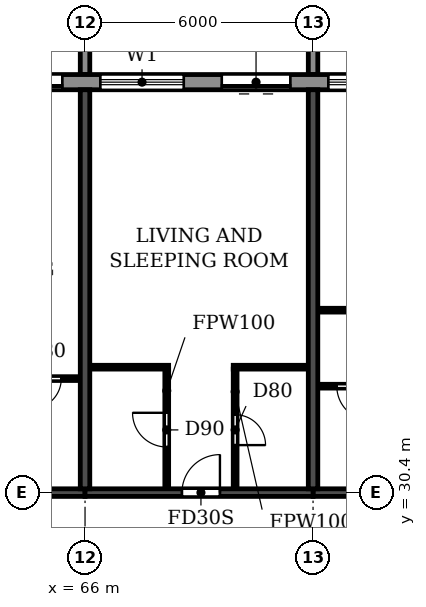
"""IFC4 building model, lengths in metres.
Left out: names, types, materials, properties, quantities, classifications, styles, units other than length and angle.
Written with IfcOpenShell. Run it as: python <this file> out.ifc"""

import sys

from ifc_helpers import new_model, si_unit, direction, frame, frame_2d, origin, place, context, subcontext, project, spatial, polyline, rectangle, outline, extrude, source, transform, mapped, element, fill, save


model = new_model("IFC4")
c1 = context("Model", 3, precision=1e-05, world=origin(), true_north=direction((0.0, 1.0)))
c2 = subcontext(c1, "Body", "Model", "MODEL_VIEW")
j1 = project(units=[si_unit("LENGTHUNIT", "METRE"), si_unit("PLANEANGLEUNIT", "RADIAN")], contexts=[c1])
p1 = place(None, origin())
s1 = spatial("IfcSite", under=j1, at=p1, CompositionType="ELEMENT")
p2 = place(p1, origin())
s2 = spatial("IfcBuilding", under=s1, at=p2, CompositionType="ELEMENT")
p3 = place(p2, frame((0.0, 0.0, 231.3)))
s3 = spatial("IfcBuildingStorey", under=s2, at=p3, CompositionType="ELEMENT", Elevation=231.3)
for number, where, z_axis, x_axis in (
    (1, (66.0, 30.5, 0.0), (0.0, 0.0, 1.0), (0.0, 1.0, 0.0)),
    (2, (72.0, 30.5, 0.0), (0.0, 0.0, 1.0), (0.0, 1.0, 0.0)),
):
    element("IfcWall", number, at=place(p3, frame(where, z_axis=z_axis, x_axis=x_axis)), inside=s3, PredefinedType="SHEAR", context=c2, shape_type="SweptSolid", body=[
        extrude(rectangle(XDim=10.5, YDim=0.25, at=frame_2d((5.25, 0.0))), origin(), (0.0, 0.0, 1.0), 3.08),
    ])
p4 = place(p3, frame((60.0, 30.4, 0.0), z_axis=(0.0, 0.0, 1.0), x_axis=(1.0, 0.0, 0.0)))
e3 = element("IfcWall", 3, at=p4, inside=s3, PredefinedType="SHEAR", context=c2, shape_type="SweptSolid", body=[
    extrude(rectangle(XDim=6.0, YDim=0.2, at=frame_2d((3.0, 0.0))), origin(), (0.0, 0.0, 1.0), 2.48),
])
p5 = place(p4, frame((2.55, 0.0, 0.0)))
e4 = element("IfcOpeningElement", 4, at=p5, cuts=e3, PredefinedType="OPENING", context=c2, shape_type="SweptSolid", body=[
    extrude(rectangle(XDim=1.0, YDim=2.1, at=frame_2d((0.5, 1.05))), frame((0.0, 0.11, 0.0), z_axis=(0.0, -1.0, 0.0), x_axis=(1.0, 0.0, 0.0)), (0.0, 0.0, 1.0), 0.22),
])
p6 = place(p3, frame((66.0, 30.4, 0.0), z_axis=(0.0, 0.0, 1.0), x_axis=(1.0, 0.0, 0.0)))
e5 = element("IfcWall", 5, at=p6, inside=s3, PredefinedType="SHEAR", context=c2, shape_type="SweptSolid", body=[
    extrude(rectangle(XDim=6.0, YDim=0.2, at=frame_2d((3.0, 0.0))), origin(), (0.0, 0.0, 1.0), 2.48),
])
p7 = place(p6, frame((2.55, 0.0, 0.0)))
e6 = element("IfcOpeningElement", 6, at=p7, cuts=e5, PredefinedType="OPENING", context=c2, shape_type="SweptSolid", body=[
    extrude(rectangle(XDim=1.0, YDim=2.1, at=frame_2d((0.5, 1.05))), frame((0.0, 0.11, 0.0), z_axis=(0.0, -1.0, 0.0), x_axis=(1.0, 0.0, 0.0)), (0.0, 0.0, 1.0), 0.22),
])
p8 = place(p3, frame((72.0, 30.4, 0.0), z_axis=(0.0, 0.0, 1.0), x_axis=(1.0, 0.0, 0.0)))
e7 = element("IfcWall", 7, at=p8, inside=s3, PredefinedType="SHEAR", context=c2, shape_type="SweptSolid", body=[
    extrude(rectangle(XDim=6.0, YDim=0.2, at=frame_2d((3.0, 0.0))), origin(), (0.0, 0.0, 1.0), 2.48),
])
p9 = place(p8, frame((2.55, 0.0, 0.0)))
e8 = element("IfcOpeningElement", 8, at=p9, cuts=e7, PredefinedType="OPENING", context=c2, shape_type="SweptSolid", body=[
    extrude(rectangle(XDim=1.0, YDim=2.1, at=frame_2d((0.5, 1.05))), frame((0.0, 0.11, 0.0), z_axis=(0.0, -1.0, 0.0), x_axis=(1.0, 0.0, 0.0)), (0.0, 0.0, 1.0), 0.22),
])
p10 = place(p3, frame((79.317, 41.2, 0.0), z_axis=(0.0, 0.0, 1.0), x_axis=(-1.0, 0.0, 0.0)))
e9 = element("IfcWall", 9, at=p10, inside=s3, PredefinedType="STANDARD", context=c2, shape_type="SweptSolid", body=[
    extrude(rectangle(XDim=56.634, YDim=0.4, at=frame_2d((28.317, 0.0))), origin(), (0.0, 0.0, 1.0), 3.08),
])
p11 = place(p10, frame((52.917, 0.0, 0.0)))
e10 = element("IfcOpeningElement", 10, at=p11, cuts=e9, PredefinedType="OPENING", context=c2, shape_type="SweptSolid", body=[
    extrude(rectangle(XDim=1.8, YDim=2.4, at=frame_2d((0.9, 1.2))), frame((0.0, 0.21, 0.0), z_axis=(0.0, -1.0, 0.0), x_axis=(1.0, 0.0, 0.0)), (0.0, 0.0, 1.0), 0.42),
])
p12 = place(p10, frame((49.717, 0.0, 0.9)))
e11 = element("IfcOpeningElement", 11, at=p12, cuts=e9, PredefinedType="OPENING", context=c2, shape_type="SweptSolid", body=[
    extrude(rectangle(XDim=2.2, YDim=1.5, at=frame_2d((1.1, 0.75))), frame((0.0, 0.21, 0.0), z_axis=(0.0, -1.0, 0.0), x_axis=(1.0, 0.0, 0.0)), (0.0, 0.0, 1.0), 0.42),
])
p13 = place(p10, frame((46.717, 0.0, 0.9)))
e12 = element("IfcOpeningElement", 12, at=p13, cuts=e9, PredefinedType="OPENING", context=c2, shape_type="SweptSolid", body=[
    extrude(rectangle(XDim=2.2, YDim=1.5, at=frame_2d((1.1, 0.75))), frame((0.0, 0.21, 0.0), z_axis=(0.0, -1.0, 0.0), x_axis=(1.0, 0.0, 0.0)), (0.0, 0.0, 1.0), 0.42),
])
p14 = place(p10, frame((43.717, 0.0, 0.9)))
e13 = element("IfcOpeningElement", 13, at=p14, cuts=e9, PredefinedType="OPENING", context=c2, shape_type="SweptSolid", body=[
    extrude(rectangle(XDim=2.2, YDim=1.5, at=frame_2d((1.1, 0.75))), frame((0.0, 0.21, 0.0), z_axis=(0.0, -1.0, 0.0), x_axis=(1.0, 0.0, 0.0)), (0.0, 0.0, 1.0), 0.42),
])
p15 = place(p10, frame((40.717, 0.0, 0.9)))
e14 = element("IfcOpeningElement", 14, at=p15, cuts=e9, PredefinedType="OPENING", context=c2, shape_type="SweptSolid", body=[
    extrude(rectangle(XDim=2.2, YDim=1.5, at=frame_2d((1.1, 0.75))), frame((0.0, 0.21, 0.0), z_axis=(0.0, -1.0, 0.0), x_axis=(1.0, 0.0, 0.0)), (0.0, 0.0, 1.0), 0.42),
])
p16 = place(p10, frame((37.917, 0.0, 0.0)))
e15 = element("IfcOpeningElement", 15, at=p16, cuts=e9, PredefinedType="OPENING", context=c2, shape_type="SweptSolid", body=[
    extrude(rectangle(XDim=1.8, YDim=2.4, at=frame_2d((0.9, 1.2))), frame((0.0, 0.21, 0.0), z_axis=(0.0, -1.0, 0.0), x_axis=(1.0, 0.0, 0.0)), (0.0, 0.0, 1.0), 0.42),
])
p17 = place(p10, frame((34.717, 0.0, 0.9)))
e16 = element("IfcOpeningElement", 16, at=p17, cuts=e9, PredefinedType="OPENING", context=c2, shape_type="SweptSolid", body=[
    extrude(rectangle(XDim=2.2, YDim=1.5, at=frame_2d((1.1, 0.75))), frame((0.0, 0.21, 0.0), z_axis=(0.0, -1.0, 0.0), x_axis=(1.0, 0.0, 0.0)), (0.0, 0.0, 1.0), 0.42),
])
p18 = place(p10, frame((31.917, 0.0, 0.0)))
e17 = element("IfcOpeningElement", 17, at=p18, cuts=e9, PredefinedType="OPENING", context=c2, shape_type="SweptSolid", body=[
    extrude(rectangle(XDim=1.8, YDim=2.4, at=frame_2d((0.9, 1.2))), frame((0.0, 0.21, 0.0), z_axis=(0.0, -1.0, 0.0), x_axis=(1.0, 0.0, 0.0)), (0.0, 0.0, 1.0), 0.42),
])
p19 = place(p10, frame((28.717, 0.0, 0.9)))
e18 = element("IfcOpeningElement", 18, at=p19, cuts=e9, PredefinedType="OPENING", context=c2, shape_type="SweptSolid", body=[
    extrude(rectangle(XDim=2.2, YDim=1.5, at=frame_2d((1.1, 0.75))), frame((0.0, 0.21, 0.0), z_axis=(0.0, -1.0, 0.0), x_axis=(1.0, 0.0, 0.0)), (0.0, 0.0, 1.0), 0.42),
])
p20 = place(p10, frame((25.917, 0.0, 0.0)))
e19 = element("IfcOpeningElement", 19, at=p20, cuts=e9, PredefinedType="OPENING", context=c2, shape_type="SweptSolid", body=[
    extrude(rectangle(XDim=1.8, YDim=2.4, at=frame_2d((0.9, 1.2))), frame((0.0, 0.21, 0.0), z_axis=(0.0, -1.0, 0.0), x_axis=(1.0, 0.0, 0.0)), (0.0, 0.0, 1.0), 0.42),
])
p21 = place(p10, frame((22.717, 0.0, 0.9)))
e20 = element("IfcOpeningElement", 20, at=p21, cuts=e9, PredefinedType="OPENING", context=c2, shape_type="SweptSolid", body=[
    extrude(rectangle(XDim=2.2, YDim=1.5, at=frame_2d((1.1, 0.75))), frame((0.0, 0.21, 0.0), z_axis=(0.0, -1.0, 0.0), x_axis=(1.0, 0.0, 0.0)), (0.0, 0.0, 1.0), 0.42),
])
p22 = place(p10, frame((19.717, 0.0, 0.9)))
e21 = element("IfcOpeningElement", 21, at=p22, cuts=e9, PredefinedType="OPENING", context=c2, shape_type="SweptSolid", body=[
    extrude(rectangle(XDim=2.2, YDim=1.5, at=frame_2d((1.1, 0.75))), frame((0.0, 0.21, 0.0), z_axis=(0.0, -1.0, 0.0), x_axis=(1.0, 0.0, 0.0)), (0.0, 0.0, 1.0), 0.42),
])
p23 = place(p10, frame((16.717, 0.0, 0.9)))
e22 = element("IfcOpeningElement", 22, at=p23, cuts=e9, PredefinedType="OPENING", context=c2, shape_type="SweptSolid", body=[
    extrude(rectangle(XDim=2.2, YDim=1.5, at=frame_2d((1.1, 0.75))), frame((0.0, 0.21, 0.0), z_axis=(0.0, -1.0, 0.0), x_axis=(1.0, 0.0, 0.0)), (0.0, 0.0, 1.0), 0.42),
])
p24 = place(p10, frame((13.917, 0.0, 0.0)))
e23 = element("IfcOpeningElement", 23, at=p24, cuts=e9, PredefinedType="OPENING", context=c2, shape_type="SweptSolid", body=[
    extrude(rectangle(XDim=1.8, YDim=2.4, at=frame_2d((0.9, 1.2))), frame((0.0, 0.21, 0.0), z_axis=(0.0, -1.0, 0.0), x_axis=(1.0, 0.0, 0.0)), (0.0, 0.0, 1.0), 0.42),
])
p25 = place(p10, frame((10.717, 0.0, 0.9)))
e24 = element("IfcOpeningElement", 24, at=p25, cuts=e9, PredefinedType="OPENING", context=c2, shape_type="SweptSolid", body=[
    extrude(rectangle(XDim=2.2, YDim=1.5, at=frame_2d((1.1, 0.75))), frame((0.0, 0.21, 0.0), z_axis=(0.0, -1.0, 0.0), x_axis=(1.0, 0.0, 0.0)), (0.0, 0.0, 1.0), 0.42),
])
p26 = place(p10, frame((7.917, 0.0, 0.0)))
e25 = element("IfcOpeningElement", 25, at=p26, cuts=e9, PredefinedType="OPENING", context=c2, shape_type="SweptSolid", body=[
    extrude(rectangle(XDim=1.8, YDim=2.4, at=frame_2d((0.9, 1.2))), frame((0.0, 0.21, 0.0), z_axis=(0.0, -1.0, 0.0), x_axis=(1.0, 0.0, 0.0)), (0.0, 0.0, 1.0), 0.42),
])
p27 = place(p10, frame((4.717, 0.0, 0.9)))
e26 = element("IfcOpeningElement", 26, at=p27, cuts=e9, PredefinedType="OPENING", context=c2, shape_type="SweptSolid", body=[
    extrude(rectangle(XDim=2.2, YDim=1.5, at=frame_2d((1.1, 0.75))), frame((0.0, 0.21, 0.0), z_axis=(0.0, -1.0, 0.0), x_axis=(1.0, 0.0, 0.0)), (0.0, 0.0, 1.0), 0.42),
])
p28 = place(p10, frame((1.917, 0.0, 0.0)))
e27 = element("IfcOpeningElement", 27, at=p28, cuts=e9, PredefinedType="OPENING", context=c2, shape_type="SweptSolid", body=[
    extrude(rectangle(XDim=1.8, YDim=2.4, at=frame_2d((0.9, 1.2))), frame((0.0, 0.21, 0.0), z_axis=(0.0, -1.0, 0.0), x_axis=(1.0, 0.0, 0.0)), (0.0, 0.0, 1.0), 0.42),
])
m1 = source(origin(), c2, "Body", "SweptSolid", [
    extrude(outline(polyline([(0.0, 0.0), (0.25, 0.0), (0.25, 3.1), (0.0, 3.1), (0.0, 0.0)])), origin(), (0.0, 0.0, 1.0), 3.1),
])
for number, where in (
    (28, (65.875, 41.4, 0.0)),
    (29, (71.875, 41.4, 0.0)),
):
    element("IfcWall", number, at=place(p3, frame(where)), inside=s3, PredefinedType="STANDARD", context=c2, shape_type="MappedRepresentation", body=[
        mapped(m1, transform((0.0, 0.0, 0.0))),
    ])
p29 = place(p3, frame((72.135, 33.2, 0.0), z_axis=(0.0, 0.0, 1.0), x_axis=(1.0, 0.0, 0.0)))
e30 = element("IfcWall", 30, at=p29, inside=s3, PredefinedType="PARTITIONING", context=c2, shape_type="SweptSolid", body=[
    extrude(rectangle(XDim=2.065, YDim=0.1, at=frame_2d((1.032, 0.0))), origin(), (0.0, 0.0, 1.0), 3.08),
])
p30 = place(p29, frame((0.49, 0.0, 0.0)))
e31 = element("IfcOpeningElement", 31, at=p30, cuts=e30, PredefinedType="OPENING", context=c2, shape_type="SweptSolid", body=[
    extrude(rectangle(XDim=0.9, YDim=2.1, at=frame_2d((0.45, 1.05))), frame((0.0, 0.06, 0.0), z_axis=(0.0, -1.0, 0.0), x_axis=(1.0, 0.0, 0.0)), (0.0, 0.0, 1.0), 0.12),
])
p31 = place(p3, frame((63.9, 33.4, 0.0), z_axis=(0.0, 0.0, 1.0), x_axis=(1.0, 0.0, 0.0)))
e32 = element("IfcWall", 32, at=p31, inside=s3, PredefinedType="PARTITIONING", context=c2, shape_type="SweptSolid", body=[
    extrude(rectangle(XDim=1.965, YDim=0.1, at=frame_2d((0.982, 0.0))), origin(), (0.0, 0.0, 1.0), 3.08),
])
p32 = place(p31, frame((0.675, 0.0, 0.0)))
e33 = element("IfcOpeningElement", 33, at=p32, cuts=e32, PredefinedType="OPENING", context=c2, shape_type="SweptSolid", body=[
    extrude(rectangle(XDim=0.8, YDim=2.1, at=frame_2d((0.4, 1.05))), frame((0.0, 0.06, 0.0), z_axis=(0.0, -1.0, 0.0), x_axis=(1.0, 0.0, 0.0)), (0.0, 0.0, 1.0), 0.12),
])
p33 = place(p3, frame((66.135, 33.7, 0.0), z_axis=(0.0, 0.0, 1.0), x_axis=(1.0, 0.0, 0.0)))
e34 = element("IfcWall", 34, at=p33, inside=s3, PredefinedType="PARTITIONING", context=c2, shape_type="SweptSolid", body=[
    extrude(rectangle(XDim=2.065, YDim=0.1, at=frame_2d((1.032, 0.0))), origin(), (0.0, 0.0, 1.0), 3.08),
])
p34 = place(p3, frame((69.9, 33.7, 0.0), z_axis=(0.0, 0.0, 1.0), x_axis=(1.0, 0.0, 0.0)))
e35 = element("IfcWall", 35, at=p34, inside=s3, PredefinedType="PARTITIONING", context=c2, shape_type="SweptSolid", body=[
    extrude(rectangle(XDim=1.965, YDim=0.1, at=frame_2d((0.982, 0.0))), origin(), (0.0, 0.0, 1.0), 3.08),
])
p35 = place(p3, frame((72.135, 35.2, 0.0), z_axis=(0.0, 0.0, 1.0), x_axis=(1.0, 0.0, 0.0)))
e36 = element("IfcWall", 36, at=p35, inside=s3, PredefinedType="PARTITIONING", context=c2, shape_type="SweptSolid", body=[
    extrude(rectangle(XDim=2.915, YDim=0.1, at=frame_2d((1.458, 0.0))), origin(), (0.0, 0.0, 1.0), 3.08),
])
p36 = place(p35, frame((1.465, 0.0, 0.0)))
e37 = element("IfcOpeningElement", 37, at=p36, cuts=e36, PredefinedType="OPENING", context=c2, shape_type="SweptSolid", body=[
    extrude(rectangle(XDim=0.9, YDim=2.1, at=frame_2d((0.45, 1.05))), frame((0.0, 0.06, 0.0), z_axis=(0.0, -1.0, 0.0), x_axis=(1.0, 0.0, 0.0)), (0.0, 0.0, 1.0), 0.12),
])
p37 = place(p3, frame((68.15, 30.51, 0.0), z_axis=(0.0, 0.0, 1.0), x_axis=(0.0, 1.0, 0.0)))
e38 = element("IfcWall", 38, at=p37, inside=s3, PredefinedType="PARTITIONING", context=c2, shape_type="SweptSolid", body=[
    extrude(rectangle(XDim=3.14, YDim=0.1, at=frame_2d((1.57, 0.0))), origin(), (0.0, 0.0, 1.0), 3.08),
])
p38 = place(p37, frame((1.09, 0.0, 0.0)))
e39 = element("IfcOpeningElement", 39, at=p38, cuts=e38, PredefinedType="OPENING", context=c2, shape_type="SweptSolid", body=[
    extrude(rectangle(XDim=0.9, YDim=2.1, at=frame_2d((0.45, 1.05))), frame((0.0, 0.06, 0.0), z_axis=(0.0, -1.0, 0.0), x_axis=(1.0, 0.0, 0.0)), (0.0, 0.0, 1.0), 0.12),
])
p39 = place(p3, frame((69.95, 30.51, 0.0), z_axis=(0.0, 0.0, 1.0), x_axis=(0.0, 1.0, 0.0)))
e40 = element("IfcWall", 40, at=p39, inside=s3, PredefinedType="PARTITIONING", context=c2, shape_type="SweptSolid", body=[
    extrude(rectangle(XDim=3.14, YDim=0.1, at=frame_2d((1.57, 0.0))), origin(), (0.0, 0.0, 1.0), 3.08),
])
p40 = place(p39, frame((1.14, 0.0, 0.0)))
e41 = element("IfcOpeningElement", 41, at=p40, cuts=e40, PredefinedType="OPENING", context=c2, shape_type="SweptSolid", body=[
    extrude(rectangle(XDim=0.8, YDim=2.1, at=frame_2d((0.4, 1.05))), frame((0.0, 0.06, 0.0), z_axis=(0.0, -1.0, 0.0), x_axis=(1.0, 0.0, 0.0)), (0.0, 0.0, 1.0), 0.12),
])
p41 = place(p24, origin())
e42 = element("IfcDoor", 42, at=p41, inside=s3, OperationType="DOUBLE_DOOR_SLIDING", PredefinedType="DOOR", context=c2, shape_type="SweptSolid", body=[
    extrude(rectangle(XDim=1.8, YDim=2.4, at=frame_2d((0.9, 1.2))), frame((0.0, 0.025, 0.0), z_axis=(0.0, -1.0, 0.0), x_axis=(1.0, 0.0, 0.0)), (0.0, 0.0, 1.0), 0.05),
])
fill(e23, e42)
p42 = place(p25, origin())
e43 = element("IfcWindow", 43, at=p42, inside=s3, PartitioningType="DOUBLE_PANEL_HORIZONTAL", PredefinedType="WINDOW", context=c2, shape_type="SweptSolid", body=[
    extrude(rectangle(XDim=2.2, YDim=1.5, at=frame_2d((1.1, 0.75))), frame((0.0, 0.03, 0.0), z_axis=(0.0, -1.0, 0.0), x_axis=(1.0, 0.0, 0.0)), (0.0, 0.0, 1.0), 0.06),
])
fill(e24, e43)
p43 = place(p26, origin())
e44 = element("IfcDoor", 44, at=p43, inside=s3, OperationType="DOUBLE_DOOR_SLIDING", PredefinedType="DOOR", context=c2, shape_type="SweptSolid", body=[
    extrude(rectangle(XDim=1.8, YDim=2.4, at=frame_2d((0.9, 1.2))), frame((0.0, 0.025, 0.0), z_axis=(0.0, -1.0, 0.0), x_axis=(1.0, 0.0, 0.0)), (0.0, 0.0, 1.0), 0.05),
])
fill(e25, e44)
p44 = place(p27, origin())
e45 = element("IfcWindow", 45, at=p44, inside=s3, PartitioningType="DOUBLE_PANEL_HORIZONTAL", PredefinedType="WINDOW", context=c2, shape_type="SweptSolid", body=[
    extrude(rectangle(XDim=2.2, YDim=1.5, at=frame_2d((1.1, 0.75))), frame((0.0, 0.03, 0.0), z_axis=(0.0, -1.0, 0.0), x_axis=(1.0, 0.0, 0.0)), (0.0, 0.0, 1.0), 0.06),
])
fill(e26, e45)
p45 = place(p32, frame((0.8, 0.0, 0.0), z_axis=(0.0, 0.0, 1.0), x_axis=(-1.0, 0.0, 0.0)))
e46 = element("IfcDoor", 46, at=p45, inside=s3, OperationType="SINGLE_SWING_RIGHT", PredefinedType="DOOR", context=c2, shape_type="SweptSolid", body=[
    extrude(rectangle(XDim=0.8, YDim=2.1, at=frame_2d((0.4, 1.05))), frame((0.0, 0.025, 0.0), z_axis=(0.0, -1.0, 0.0), x_axis=(1.0, 0.0, 0.0)), (0.0, 0.0, 1.0), 0.05),
])
fill(e33, e46)
p46 = place(p38, origin())
e47 = element("IfcDoor", 47, at=p46, inside=s3, OperationType="SINGLE_SWING_RIGHT", PredefinedType="DOOR", context=c2, shape_type="SweptSolid", body=[
    extrude(rectangle(XDim=0.9, YDim=2.1, at=frame_2d((0.45, 1.05))), frame((0.0, 0.025, 0.0), z_axis=(0.0, -1.0, 0.0), x_axis=(1.0, 0.0, 0.0)), (0.0, 0.0, 1.0), 0.05),
])
fill(e39, e47)
p47 = place(p7, origin())
e48 = element("IfcDoor", 48, at=p47, inside=s3, OperationType="SINGLE_SWING_RIGHT", PredefinedType="DOOR", context=c2, shape_type="SweptSolid", body=[
    extrude(rectangle(XDim=1.0, YDim=2.1, at=frame_2d((0.5, 1.05))), frame((0.0, 0.025, 0.0), z_axis=(0.0, -1.0, 0.0), x_axis=(1.0, 0.0, 0.0)), (0.0, 0.0, 1.0), 0.05),
])
fill(e6, e48)
p48 = place(p40, frame((0.8, 0.0, 0.0), z_axis=(0.0, 0.0, 1.0), x_axis=(-1.0, 0.0, 0.0)))
e49 = element("IfcDoor", 49, at=p48, inside=s3, OperationType="SINGLE_SWING_RIGHT", PredefinedType="DOOR", context=c2, shape_type="SweptSolid", body=[
    extrude(rectangle(XDim=0.8, YDim=2.1, at=frame_2d((0.4, 1.05))), frame((0.0, 0.025, 0.0), z_axis=(0.0, -1.0, 0.0), x_axis=(1.0, 0.0, 0.0)), (0.0, 0.0, 1.0), 0.05),
])
fill(e41, e49)
p49 = place(p30, frame((0.9, 0.0, 0.0), z_axis=(0.0, 0.0, 1.0), x_axis=(-1.0, 0.0, 0.0)))
e50 = element("IfcDoor", 50, at=p49, inside=s3, OperationType="SINGLE_SWING_LEFT", PredefinedType="DOOR", context=c2, shape_type="SweptSolid", body=[
    extrude(rectangle(XDim=0.9, YDim=2.1, at=frame_2d((0.45, 1.05))), frame((0.0, 0.025, 0.0), z_axis=(0.0, -1.0, 0.0), x_axis=(1.0, 0.0, 0.0)), (0.0, 0.0, 1.0), 0.05),
])
fill(e31, e50)
save(model, sys.argv[1])
